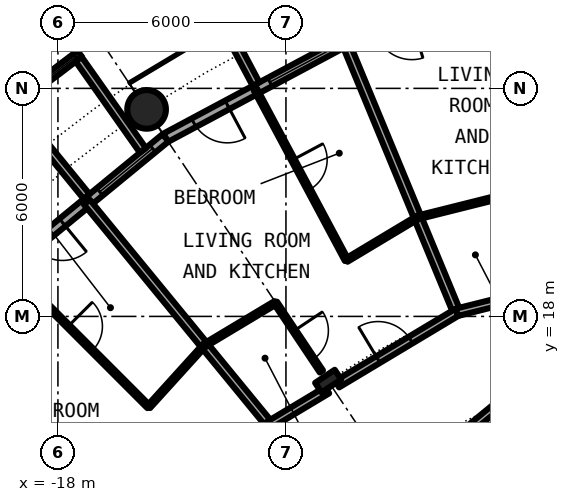
"""IFC4 building model, lengths in metres.
Left out: names, types, materials, properties, quantities, classifications, styles, units other than length and angle.
Written with IfcOpenShell. Run it as: python <this file> out.ifc"""

import sys

from ifc_helpers import new_model, si_unit, direction, frame, frame_2d, origin, origin_2d, place, context, subcontext, project, spatial, rectangle, circle, hollow_circle, i_section, extrude, element, fill, save


model = new_model("IFC4")
c1 = context("Model", 3, precision=1e-05, world=origin(), true_north=direction((0.0, 1.0)))
c2 = subcontext(c1, "Body", "Model", "MODEL_VIEW")
j1 = project(units=[si_unit("LENGTHUNIT", "METRE"), si_unit("PLANEANGLEUNIT", "RADIAN")], contexts=[c1])
p1 = place(None, origin())
s1 = spatial("IfcSite", under=j1, at=p1, CompositionType="ELEMENT")
p2 = place(p1, origin())
s2 = spatial("IfcBuilding", under=s1, at=p2, CompositionType="ELEMENT")
p3 = place(p2, frame((0.0, 0.0, 22.8)))
s3 = spatial("IfcBuildingStorey", under=s2, at=p3, CompositionType="ELEMENT", Elevation=22.8)
p4 = place(p3, frame((-15.667, 23.448, 0.0), z_axis=(0.0, 0.0, 1.0), x_axis=(1.0, 0.0, 0.0)))
e1 = element("IfcColumn", 1, at=p4, inside=s3, PredefinedType="COLUMN", context=c2, shape_type="SweptSolid", body=[
    extrude(hollow_circle(Radius=0.508, WallThickness=0.05, at=origin_2d()), origin(), (0.0, 0.0, 1.0), 3.05),
])
p5 = place(p3, frame((-10.889, 16.297, 0.0), z_axis=(0.0, 0.0, 1.0), x_axis=(-0.55557023302, 0.831469612303, 0.0)))
e2 = element("IfcColumn", 2, at=p5, inside=s3, PredefinedType="COLUMN", context=c2, shape_type="SweptSolid", body=[
    extrude(i_section(OverallWidth=0.305, OverallDepth=0.62, WebThickness=0.021, FlangeThickness=0.04, FilletRadius=0.027, at=origin_2d()), origin(), (0.0, 0.0, 1.0), 3.05),
])
p6 = place(p3, frame((-10.447, 25.222, 0.0), z_axis=(0.0, 0.0, 1.0), x_axis=(-0.881915646801, -0.471407246368, 0.0)))
e3 = element("IfcWall", 3, at=p6, inside=s3, PredefinedType="SOLIDWALL", context=c2, shape_type="SweptSolid", body=[
    extrude(rectangle(XDim=5.352, YDim=0.25, at=frame_2d((2.676, 0.0))), origin(), (0.0, 0.0, 1.0), 2.7),
])
p7 = place(p6, frame((0.441, 0.0, 0.3)))
e4 = element("IfcOpeningElement", 4, at=p7, cuts=e3, PredefinedType="OPENING", context=c2, shape_type="SweptSolid", body=[
    extrude(rectangle(XDim=1.8, YDim=2.1, at=frame_2d((0.9, 1.05))), frame((0.0, 0.135, 0.0), z_axis=(0.0, -1.0, 0.0), x_axis=(1.0, 0.0, 0.0)), (0.0, 0.0, 1.0), 0.27),
])
p8 = place(p6, frame((3.51, 0.0, 0.0)))
e5 = element("IfcOpeningElement", 5, at=p8, cuts=e3, PredefinedType="OPENING", context=c2, shape_type="SweptSolid", body=[
    extrude(rectangle(XDim=1.0, YDim=2.2, at=frame_2d((0.5, 1.1))), frame((0.0, 0.135, 0.0), z_axis=(0.0, -1.0, 0.0), x_axis=(1.0, 0.0, 0.0)), (0.0, 0.0, 1.0), 0.27),
])
p9 = place(p3, frame((-12.787, 24.113, -0.03), z_axis=(0.0, 0.0, 1.0), x_axis=(-0.468365282436, 0.883534924159, 0.0)))
e6 = element("IfcWall", 6, at=p9, inside=s3, PredefinedType="SOLIDWALL", context=c2, shape_type="SweptSolid", body=[
    extrude(rectangle(XDim=3.006, YDim=0.2, at=frame_2d((1.503, 0.0))), origin(), (0.0, 0.0, 1.0), 2.73),
])
p10 = place(p3, frame((-15.167, 22.699, 0.0), z_axis=(0.0, 0.0, 1.0), x_axis=(-0.773019449054, -0.634382322723, 0.0)))
e7 = element("IfcWall", 7, at=p10, inside=s3, PredefinedType="SOLIDWALL", context=c2, shape_type="SweptSolid", body=[
    extrude(rectangle(XDim=5.352, YDim=0.25, at=frame_2d((2.676, 0.0))), origin(), (0.0, 0.0, 1.0), 2.7),
])
p11 = place(p10, frame((0.441, 0.0, 0.3)))
e8 = element("IfcOpeningElement", 8, at=p11, cuts=e7, PredefinedType="OPENING", context=c2, shape_type="SweptSolid", body=[
    extrude(rectangle(XDim=1.8, YDim=2.1, at=frame_2d((0.9, 1.05))), frame((0.0, 0.135, 0.0), z_axis=(0.0, -1.0, 0.0), x_axis=(1.0, 0.0, 0.0)), (0.0, 0.0, 1.0), 0.27),
])
p12 = place(p10, frame((3.51, 0.0, 0.0)))
e9 = element("IfcOpeningElement", 9, at=p12, cuts=e7, PredefinedType="OPENING", context=c2, shape_type="SweptSolid", body=[
    extrude(rectangle(XDim=1.0, YDim=2.2, at=frame_2d((0.5, 1.1))), frame((0.0, 0.135, 0.0), z_axis=(0.0, -1.0, 0.0), x_axis=(1.0, 0.0, 0.0)), (0.0, 0.0, 1.0), 0.27),
])
p13 = place(p3, frame((-17.427, 24.909, -0.03), z_axis=(0.0, 0.0, 1.0), x_axis=(-0.796842165306, -0.60418752353, 0.0)))
e10 = element("IfcWall", 10, at=p13, inside=s3, PredefinedType="SOLIDWALL", context=c2, shape_type="SweptSolid", body=[
    extrude(rectangle(XDim=2.337, YDim=0.2, at=frame_2d((1.168, 0.0))), origin(), (0.0, 0.0, 1.0), 2.73),
])
p14 = place(p13, frame((0.128, 0.0, 0.33)))
e11 = element("IfcOpeningElement", 11, at=p14, cuts=e10, PredefinedType="OPENING", context=c2, shape_type="SweptSolid", body=[
    extrude(circle(Radius=1.04, at=frame_2d((1.04, 1.04))), frame((0.0, 0.11, 0.0), z_axis=(0.0, -1.0, 0.0), x_axis=(1.0, 0.0, 0.0)), (0.0, 0.0, 1.0), 0.22),
])
p15 = place(p3, frame((-15.765, 22.37, -0.03), z_axis=(0.0, 0.0, 1.0), x_axis=(-0.576274612209, 0.817256123454, 0.0)))
e12 = element("IfcWall", 12, at=p15, inside=s3, PredefinedType="SOLIDWALL", context=c2, shape_type="SweptSolid", body=[
    extrude(rectangle(XDim=2.933, YDim=0.2, at=frame_2d((1.466, 0.0))), origin(), (0.0, 0.0, 1.0), 2.73),
])
p16 = place(p3, frame((-17.246, 21.155, -0.03), z_axis=(0.0, 0.0, 1.0), x_axis=(-0.631741648902, 0.775179004516, 0.0)))
e13 = element("IfcWall", 13, at=p16, inside=s3, PredefinedType="SOLIDWALL", context=c2, shape_type="SweptSolid", body=[
    extrude(rectangle(XDim=3.006, YDim=0.2, at=frame_2d((1.503, 0.0))), origin(), (0.0, 0.0, 1.0), 2.73),
])
p17 = place(p3, frame((-19.21, 19.222, 0.0), z_axis=(0.0, 0.0, 1.0), x_axis=(0.706914880313, -0.707298629994, 0.0)))
e14 = element("IfcWall", 14, at=p17, inside=s3, PredefinedType="PARTITIONING", context=c2, shape_type="SweptSolid", body=[
    extrude(rectangle(XDim=5.09, YDim=0.1, at=frame_2d((2.545, 0.0))), origin(), (0.0, 0.0, 1.0), 2.7),
])
p18 = place(p17, frame((2.095, 0.0, 0.0)))
e15 = element("IfcOpeningElement", 15, at=p18, cuts=e14, PredefinedType="OPENING", context=c2, shape_type="SweptSolid", body=[
    extrude(rectangle(XDim=0.9, YDim=2.3, at=frame_2d((0.45, 1.15))), frame((0.0, 0.06, 0.0), z_axis=(0.0, -1.0, 0.0), x_axis=(1.0, 0.0, 0.0)), (0.0, 0.0, 1.0), 0.12),
])
p19 = place(p3, frame((-17.239, 21.008, 0.0), z_axis=(0.0, 0.0, 1.0), x_axis=(0.634318093068, -0.773072154981, 0.0)))
e16 = element("IfcWall", 16, at=p19, inside=s3, PredefinedType="PARTITIONING", context=c2, shape_type="SweptSolid", body=[
    extrude(rectangle(XDim=7.576, YDim=0.2, at=frame_2d((3.788, 0.0))), origin(), (0.0, 0.0, 1.0), 2.7),
])
p20 = place(p3, frame((-12.803, 23.97, 0.0), z_axis=(0.0, 0.0, 1.0), x_axis=(0.471170755767, -0.882042016522, 0.0)))
e17 = element("IfcWall", 17, at=p20, inside=s3, PredefinedType="PARTITIONING", context=c2, shape_type="SweptSolid", body=[
    extrude(rectangle(XDim=5.089, YDim=0.1, at=frame_2d((2.545, 0.0))), origin(), (0.0, 0.0, 1.0), 2.7),
])
p21 = place(p20, frame((2.095, 0.0, 0.0)))
e18 = element("IfcOpeningElement", 18, at=p21, cuts=e17, PredefinedType="OPENING", context=c2, shape_type="SweptSolid", body=[
    extrude(rectangle(XDim=0.9, YDim=2.3, at=frame_2d((0.45, 1.15))), frame((0.0, 0.06, 0.0), z_axis=(0.0, -1.0, 0.0), x_axis=(1.0, 0.0, 0.0)), (0.0, 0.0, 1.0), 0.12),
])
p22 = place(p3, frame((-12.276, 18.36, 0.0), z_axis=(0.0, 0.0, 1.0), x_axis=(0.55563200073, -0.831428337119, 0.0)))
e19 = element("IfcWall", 19, at=p22, inside=s3, PredefinedType="PARTITIONING", context=c2, shape_type="SweptSolid", body=[
    extrude(rectangle(XDim=2.176, YDim=0.1, at=frame_2d((1.088, 0.0))), origin(), (0.0, 0.0, 1.0), 2.7),
])
p23 = place(p22, frame((0.887, 0.0, 0.0)))
e20 = element("IfcOpeningElement", 20, at=p23, cuts=e19, PredefinedType="OPENING", context=c2, shape_type="SweptSolid", body=[
    extrude(rectangle(XDim=0.9, YDim=2.3, at=frame_2d((0.45, 1.15))), frame((0.0, 0.06, 0.0), z_axis=(0.0, -1.0, 0.0), x_axis=(1.0, 0.0, 0.0)), (0.0, 0.0, 1.0), 0.12),
])
p24 = place(p3, frame((-10.398, 25.106, 0.0), z_axis=(0.0, 0.0, 1.0), x_axis=(0.382490346157, -0.923959487801, 0.0)))
e21 = element("IfcWall", 21, at=p24, inside=s3, PredefinedType="PARTITIONING", context=c2, shape_type="SweptSolid", body=[
    extrude(rectangle(XDim=7.574, YDim=0.2, at=frame_2d((3.787, 0.0))), origin(), (0.0, 0.0, 1.0), 2.7),
])
p25 = place(p3, frame((-14.039, 9.4, 0.0), z_axis=(0.0, 0.0, 1.0), x_axis=(0.77298340166, 0.634426245326, 0.0)))
e22 = element("IfcWall", 22, at=p25, inside=s3, PredefinedType="PARTITIONING", context=c2, shape_type="SweptSolid", body=[
    extrude(rectangle(XDim=9.793, YDim=0.2, at=frame_2d((4.896, 0.0))), origin(), (0.0, 0.0, 1.0), 2.7),
])
p26 = place(p25, frame((4.389, 0.0, 0.0)))
e23 = element("IfcOpeningElement", 23, at=p26, cuts=e22, PredefinedType="OPENING", context=c2, shape_type="SweptSolid", body=[
    extrude(rectangle(XDim=1.0, YDim=2.3, at=frame_2d((0.5, 1.15))), frame((0.0, 0.11, 0.0), z_axis=(0.0, -1.0, 0.0), x_axis=(1.0, 0.0, 0.0)), (0.0, 0.0, 1.0), 0.22),
])
p27 = place(p3, frame((-12.434, 15.151, 0.0), z_axis=(0.0, 0.0, 1.0), x_axis=(0.857809047014, 0.513968519329, 0.0)))
e24 = element("IfcWall", 24, at=p27, inside=s3, PredefinedType="PARTITIONING", context=c2, shape_type="SweptSolid", body=[
    extrude(rectangle(XDim=1.771, YDim=0.2, at=frame_2d((0.885, 0.0))), origin(), (0.0, 0.0, 1.0), 2.38),
])
p28 = place(p3, frame((-10.653, 16.218, 0.0), z_axis=(0.0, 0.0, 1.0), x_axis=(0.857656999296, 0.514222200569, 0.0)))
e25 = element("IfcWall", 25, at=p28, inside=s3, PredefinedType="PARTITIONING", context=c2, shape_type="SweptSolid", body=[
    extrude(rectangle(XDim=3.675, YDim=0.2, at=frame_2d((1.838, 0.0))), origin(), (0.0, 0.0, 1.0), 2.38),
])
p29 = place(p28, frame((1.257, 0.0, 0.0)))
e26 = element("IfcOpeningElement", 26, at=p29, cuts=e25, PredefinedType="OPENING", context=c2, shape_type="SweptSolid", body=[
    extrude(rectangle(XDim=1.0, YDim=2.3, at=frame_2d((0.5, 1.15))), frame((0.0, 0.11, 0.0), z_axis=(0.0, -1.0, 0.0), x_axis=(1.0, 0.0, 0.0)), (0.0, 0.0, 1.0), 0.22),
])
p30 = place(p3, frame((-7.501, 18.108, 0.0), z_axis=(0.0, 0.0, 1.0), x_axis=(0.970040840928, 0.242941900323, 0.0)))
e27 = element("IfcWall", 27, at=p30, inside=s3, PredefinedType="PARTITIONING", context=c2, shape_type="SweptSolid", body=[
    extrude(rectangle(XDim=3.676, YDim=0.2, at=frame_2d((1.838, 0.0))), origin(), (0.0, 0.0, 1.0), 2.38),
])
p31 = place(p30, frame((2.217, 0.0, 0.0)))
e28 = element("IfcOpeningElement", 28, at=p31, cuts=e27, PredefinedType="OPENING", context=c2, shape_type="SweptSolid", body=[
    extrude(rectangle(XDim=1.0, YDim=2.3, at=frame_2d((0.5, 1.15))), frame((0.0, 0.11, 0.0), z_axis=(0.0, -1.0, 0.0), x_axis=(1.0, 0.0, 0.0)), (0.0, 0.0, 1.0), 0.22),
])
p32 = place(p3, frame((-15.612, 15.622, 0.0), z_axis=(0.0, 0.0, 1.0), x_axis=(0.671674967707, 0.740845960882, 0.0)))
e29 = element("IfcWall", 29, at=p32, inside=s3, PredefinedType="PARTITIONING", context=c2, shape_type="SweptSolid", body=[
    extrude(rectangle(XDim=2.181, YDim=0.1, at=frame_2d((1.091, 0.0))), origin(), (0.0, 0.0, 1.0), 2.7),
])
for number, where, z_axis, x_axis in (
    (30, (-14.147, 17.237, 0.0), (0.0, 0.0, 1.0), (0.858, 0.514, 0.0)),
    (31, (-10.405, 19.481, 0.0), (0.0, 0.0, 1.0), (0.858, 0.514, 0.0)),
):
    element("IfcWall", number, at=place(p3, frame(where, z_axis=z_axis, x_axis=x_axis)), inside=s3, PredefinedType="PARTITIONING", context=c2, shape_type="SweptSolid", body=[
        extrude(rectangle(XDim=2.182, YDim=0.1, at=frame_2d((1.091, 0.0))), origin(), (0.0, 0.0, 1.0), 2.7),
    ])
p33 = place(p3, frame((-8.535, 20.603, 0.0), z_axis=(0.0, 0.0, 1.0), x_axis=(0.97003047456, 0.242983288366, 0.0)))
e32 = element("IfcWall", 32, at=p33, inside=s3, PredefinedType="PARTITIONING", context=c2, shape_type="SweptSolid", body=[
    extrude(rectangle(XDim=2.181, YDim=0.1, at=frame_2d((1.091, 0.0))), origin(), (0.0, 0.0, 1.0), 2.7),
])
p34 = place(p7, origin())
e33 = element("IfcWindow", 33, at=p34, inside=s3, PartitioningType="SINGLE_PANEL", PredefinedType="WINDOW", context=c2, shape_type="SweptSolid", body=[
    extrude(rectangle(XDim=1.8, YDim=2.1, at=frame_2d((0.9, 1.05))), frame((0.0, 0.03, 0.0), z_axis=(0.0, -1.0, 0.0), x_axis=(1.0, 0.0, 0.0)), (0.0, 0.0, 1.0), 0.06),
])
fill(e4, e33)
p35 = place(p8, origin())
e34 = element("IfcDoor", 34, at=p35, inside=s3, OperationType="SINGLE_SWING_LEFT", PredefinedType="DOOR", context=c2, shape_type="SweptSolid", body=[
    extrude(rectangle(XDim=1.0, YDim=2.2, at=frame_2d((0.5, 1.1))), frame((0.0, 0.025, 0.0), z_axis=(0.0, -1.0, 0.0), x_axis=(1.0, 0.0, 0.0)), (0.0, 0.0, 1.0), 0.05),
])
fill(e5, e34)
p36 = place(p11, origin())
e35 = element("IfcWindow", 35, at=p36, inside=s3, PartitioningType="SINGLE_PANEL", PredefinedType="WINDOW", context=c2, shape_type="SweptSolid", body=[
    extrude(rectangle(XDim=1.8, YDim=2.1, at=frame_2d((0.9, 1.05))), frame((0.0, 0.03, 0.0), z_axis=(0.0, -1.0, 0.0), x_axis=(1.0, 0.0, 0.0)), (0.0, 0.0, 1.0), 0.06),
])
fill(e8, e35)
p37 = place(p14, origin())
e36 = element("IfcWindow", 36, at=p37, inside=s3, PartitioningType="SINGLE_PANEL", PredefinedType="WINDOW", context=c2, shape_type="SweptSolid", body=[
    extrude(circle(Radius=1.04, at=frame_2d((1.04, 1.04))), frame((0.0, 0.03, 0.0), z_axis=(0.0, -1.0, 0.0), x_axis=(1.0, 0.0, 0.0)), (0.0, 0.0, 1.0), 0.06),
])
fill(e11, e36)
p38 = place(p12, origin())
e37 = element("IfcDoor", 37, at=p38, inside=s3, OperationType="SINGLE_SWING_LEFT", PredefinedType="DOOR", context=c2, shape_type="SweptSolid", body=[
    extrude(rectangle(XDim=1.0, YDim=2.2, at=frame_2d((0.5, 1.1))), frame((0.0, 0.025, 0.0), z_axis=(0.0, -1.0, 0.0), x_axis=(1.0, 0.0, 0.0)), (0.0, 0.0, 1.0), 0.05),
])
fill(e9, e37)
p39 = place(p29, origin())
e38 = element("IfcDoor", 38, at=p39, inside=s3, OperationType="SINGLE_SWING_LEFT", PredefinedType="DOOR", context=c2, shape_type="SweptSolid", body=[
    extrude(rectangle(XDim=1.0, YDim=2.3, at=frame_2d((0.5, 1.15))), frame((0.0, 0.025, 0.0), z_axis=(0.0, -1.0, 0.0), x_axis=(1.0, 0.0, 0.0)), (0.0, 0.0, 1.0), 0.05),
])
fill(e26, e38)
p40 = place(p23, origin())
e39 = element("IfcDoor", 39, at=p40, inside=s3, OperationType="SINGLE_SWING_RIGHT", PredefinedType="DOOR", context=c2, shape_type="SweptSolid", body=[
    extrude(rectangle(XDim=0.9, YDim=2.3, at=frame_2d((0.45, 1.15))), frame((0.0, 0.025, 0.0), z_axis=(0.0, -1.0, 0.0), x_axis=(1.0, 0.0, 0.0)), (0.0, 0.0, 1.0), 0.05),
])
fill(e20, e39)
p41 = place(p21, origin())
e40 = element("IfcDoor", 40, at=p41, inside=s3, OperationType="SINGLE_SWING_RIGHT", PredefinedType="DOOR", context=c2, shape_type="SweptSolid", body=[
    extrude(rectangle(XDim=0.9, YDim=2.3, at=frame_2d((0.45, 1.15))), frame((0.0, 0.025, 0.0), z_axis=(0.0, -1.0, 0.0), x_axis=(1.0, 0.0, 0.0)), (0.0, 0.0, 1.0), 0.05),
])
fill(e18, e40)
p42 = place(p18, origin())
e41 = element("IfcDoor", 41, at=p42, inside=s3, OperationType="SINGLE_SWING_RIGHT", PredefinedType="DOOR", context=c2, shape_type="SweptSolid", body=[
    extrude(rectangle(XDim=0.9, YDim=2.3, at=frame_2d((0.45, 1.15))), frame((0.0, 0.025, 0.0), z_axis=(0.0, -1.0, 0.0), x_axis=(1.0, 0.0, 0.0)), (0.0, 0.0, 1.0), 0.05),
])
fill(e15, e41)
save(model, sys.argv[1])
